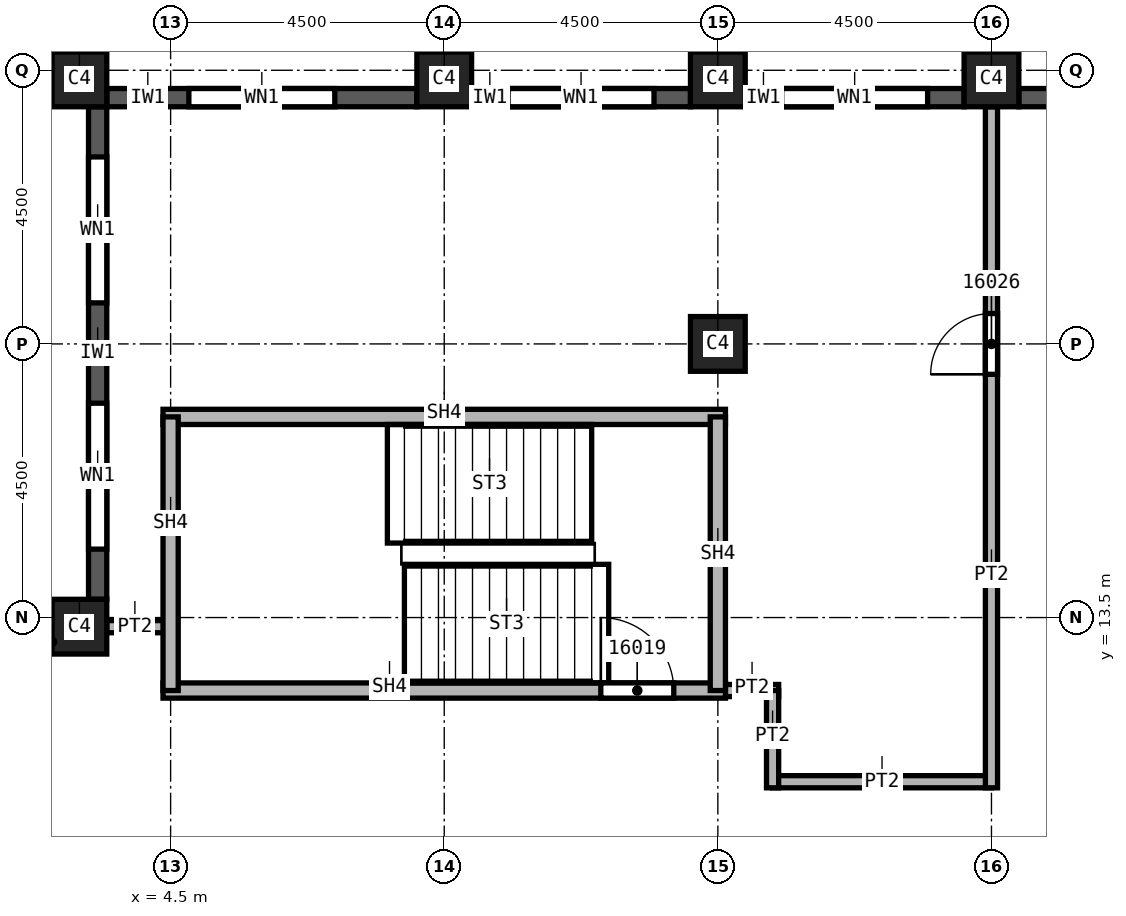
"""IFC4 building model, lengths in metres.
Left out: names, types, materials, properties, quantities, classifications, styles, units other than length and angle.
Written with IfcOpenShell. Run it as: python <this file> out.ifc"""

import sys

from ifc_helpers import new_model, si_unit, direction, frame, frame_2d, origin, origin_2d, place, context, subcontext, project, spatial, rectangle, extrude, element, fill, save


model = new_model("IFC4")
c1 = context("Model", 3, precision=1e-05, world=origin(), true_north=direction((0.0, 1.0)))
c2 = subcontext(c1, "Body", "Model", "MODEL_VIEW")
j1 = project(units=[si_unit("LENGTHUNIT", "METRE"), si_unit("PLANEANGLEUNIT", "RADIAN")], contexts=[c1])
p1 = place(None, origin())
s1 = spatial("IfcSite", under=j1, at=p1, CompositionType="ELEMENT")
p2 = place(p1, origin())
s2 = spatial("IfcBuilding", under=s1, at=p2, CompositionType="ELEMENT")
p3 = place(p2, frame((0.0, 0.0, 246.0)))
s3 = spatial("IfcBuildingStorey", under=s2, at=p3, CompositionType="ELEMENT", Elevation=246.0)
for number, where, z_axis, x_axis in (
    (1, (13.5, 18.0, 0.0), (0.0, 0.0, 1.0), (1.0, 0.0, 0.0)),
    (2, (3.0, 22.35, 0.0), (0.0, 0.0, 1.0), (1.0, 0.0, 0.0)),
    (3, (9.0, 22.35, 0.0), (0.0, 0.0, 1.0), (1.0, 0.0, 0.0)),
    (4, (13.5, 22.35, 0.0), (0.0, 0.0, 1.0), (1.0, 0.0, 0.0)),
    (5, (18.0, 22.35, 0.0), (0.0, 0.0, 1.0), (1.0, 0.0, 0.0)),
    (6, (3.0, 13.35, 0.0), (0.0, 0.0, 1.0), (1.0, 0.0, 0.0)),
):
    element("IfcColumn", number, at=place(p3, frame(where, z_axis=z_axis, x_axis=x_axis)), inside=s3, PredefinedType="COLUMN", context=c2, shape_type="SweptSolid", body=[
        extrude(rectangle(XDim=0.9, YDim=0.9, at=origin_2d()), origin(), (0.0, 0.0, 1.0), 3.72),
    ])
p4 = place(p3, frame((22.05, 22.05, 0.0), z_axis=(0.0, 0.0, 1.0), x_axis=(-1.0, 0.0, 0.0)))
e7 = element("IfcWall", 7, at=p4, inside=s3, PredefinedType="SOLIDWALL", context=c2, shape_type="SweptSolid", body=[
    extrude(rectangle(XDim=3.6, YDim=0.3, at=frame_2d((1.8, 0.0))), origin(), (0.0, 0.0, 1.0), 3.12),
])
p5 = place(p4, frame((0.775, 0.0, 0.8)))
e8 = element("IfcOpeningElement", 8, at=p5, cuts=e7, PredefinedType="OPENING", context=c2, shape_type="SweptSolid", body=[
    extrude(rectangle(XDim=1.0, YDim=1.95, at=frame_2d((0.5, 0.975))), frame((0.0, 0.15, 0.0), z_axis=(0.0, -1.0, 0.0), x_axis=(1.0, 0.0, 0.0)), (0.0, 0.0, 1.0), 0.3),
])
p6 = place(p4, frame((2.375, 0.0, 0.8)))
e9 = element("IfcOpeningElement", 9, at=p6, cuts=e7, PredefinedType="OPENING", context=c2, shape_type="SweptSolid", body=[
    extrude(rectangle(XDim=0.6, YDim=1.95, at=frame_2d((0.3, 0.975))), frame((0.0, 0.15, 0.0), z_axis=(0.0, -1.0, 0.0), x_axis=(1.0, 0.0, 0.0)), (0.0, 0.0, 1.0), 0.3),
])
p7 = place(p3, frame((17.55, 22.05, 0.0), z_axis=(0.0, 0.0, 1.0), x_axis=(-1.0, 0.0, 0.0)))
e10 = element("IfcWall", 10, at=p7, inside=s3, PredefinedType="SOLIDWALL", context=c2, shape_type="SweptSolid", body=[
    extrude(rectangle(XDim=3.6, YDim=0.3, at=frame_2d((1.8, 0.0))), origin(), (0.0, 0.0, 1.0), 3.12),
])
p8 = place(p7, frame((0.6, 0.0, 0.8)))
e11 = element("IfcOpeningElement", 11, at=p8, cuts=e10, PredefinedType="OPENING", context=c2, shape_type="SweptSolid", body=[
    extrude(rectangle(XDim=2.4, YDim=1.95, at=frame_2d((1.2, 0.975))), frame((0.0, 0.15, 0.0), z_axis=(0.0, -1.0, 0.0), x_axis=(1.0, 0.0, 0.0)), (0.0, 0.0, 1.0), 0.3),
])
p9 = place(p3, frame((13.05, 22.05, 0.0), z_axis=(0.0, 0.0, 1.0), x_axis=(-1.0, 0.0, 0.0)))
e12 = element("IfcWall", 12, at=p9, inside=s3, PredefinedType="SOLIDWALL", context=c2, shape_type="SweptSolid", body=[
    extrude(rectangle(XDim=3.6, YDim=0.3, at=frame_2d((1.8, 0.0))), origin(), (0.0, 0.0, 1.0), 3.12),
])
p10 = place(p9, frame((0.6, 0.0, 0.8)))
e13 = element("IfcOpeningElement", 13, at=p10, cuts=e12, PredefinedType="OPENING", context=c2, shape_type="SweptSolid", body=[
    extrude(rectangle(XDim=2.4, YDim=1.95, at=frame_2d((1.2, 0.975))), frame((0.0, 0.15, 0.0), z_axis=(0.0, -1.0, 0.0), x_axis=(1.0, 0.0, 0.0)), (0.0, 0.0, 1.0), 0.3),
])
p11 = place(p3, frame((8.55, 22.05, 0.0), z_axis=(0.0, 0.0, 1.0), x_axis=(-1.0, 0.0, 0.0)))
e14 = element("IfcWall", 14, at=p11, inside=s3, PredefinedType="SOLIDWALL", context=c2, shape_type="SweptSolid", body=[
    extrude(rectangle(XDim=5.1, YDim=0.3, at=frame_2d((2.55, 0.0))), origin(), (0.0, 0.0, 1.0), 3.12),
])
p12 = place(p11, frame((1.35, 0.0, 0.8)))
e15 = element("IfcOpeningElement", 15, at=p12, cuts=e14, PredefinedType="OPENING", context=c2, shape_type="SweptSolid", body=[
    extrude(rectangle(XDim=2.4, YDim=1.95, at=frame_2d((1.2, 0.975))), frame((0.0, 0.15, 0.0), z_axis=(0.0, -1.0, 0.0), x_axis=(1.0, 0.0, 0.0)), (0.0, 0.0, 1.0), 0.3),
])
p13 = place(p3, frame((3.3, 21.9, 0.0), z_axis=(0.0, 0.0, 1.0), x_axis=(0.0, -1.0, 0.0)))
e16 = element("IfcWall", 16, at=p13, inside=s3, PredefinedType="SOLIDWALL", context=c2, shape_type="SweptSolid", body=[
    extrude(rectangle(XDim=8.1, YDim=0.3, at=frame_2d((4.05, 0.0))), origin(), (0.0, 0.0, 1.0), 3.12),
])
p14 = place(p13, frame((0.825, 0.0, 0.8)))
e17 = element("IfcOpeningElement", 17, at=p14, cuts=e16, PredefinedType="OPENING", context=c2, shape_type="SweptSolid", body=[
    extrude(rectangle(XDim=2.4, YDim=1.95, at=frame_2d((1.2, 0.975))), frame((0.0, 0.15, 0.0), z_axis=(0.0, -1.0, 0.0), x_axis=(1.0, 0.0, 0.0)), (0.0, 0.0, 1.0), 0.3),
])
p15 = place(p13, frame((4.875, 0.0, 0.8)))
e18 = element("IfcOpeningElement", 18, at=p15, cuts=e16, PredefinedType="OPENING", context=c2, shape_type="SweptSolid", body=[
    extrude(rectangle(XDim=2.4, YDim=1.95, at=frame_2d((1.2, 0.975))), frame((0.0, 0.15, 0.0), z_axis=(0.0, -1.0, 0.0), x_axis=(1.0, 0.0, 0.0)), (0.0, 0.0, 1.0), 0.3),
])
p16 = place(p3, frame((3.45, 13.35, 0.0), z_axis=(0.0, 0.0, 1.0), x_axis=(1.0, 0.0, 0.0)))
e19 = element("IfcWall", 19, at=p16, inside=s3, PredefinedType="PARTITIONING", context=c2, shape_type="SweptSolid", body=[
    extrude(rectangle(XDim=1.05, YDim=0.2, at=frame_2d((0.525, 0.0))), origin(), (0.0, 0.0, 1.0), 3.72),
])
p17 = place(p3, frame((13.375, 12.3, 0.0), z_axis=(0.0, 0.0, 1.0), x_axis=(1.0, 0.0, 0.0)))
e20 = element("IfcWall", 20, at=p17, inside=s3, PredefinedType="PARTITIONING", context=c2, shape_type="SweptSolid", body=[
    extrude(rectangle(XDim=1.125, YDim=0.2, at=frame_2d((0.562, 0.0))), origin(), (0.0, 0.0, 1.0), 3.72),
])
p18 = place(p3, frame((14.4, 10.8, 0.0), z_axis=(0.0, 0.0, 1.0), x_axis=(1.0, 0.0, 0.0)))
e21 = element("IfcWall", 21, at=p18, inside=s3, PredefinedType="PARTITIONING", context=c2, shape_type="SweptSolid", body=[
    extrude(rectangle(XDim=3.6, YDim=0.2, at=frame_2d((1.8, 0.0))), origin(), (0.0, 0.0, 1.0), 3.72),
])
p19 = place(p3, frame((14.4, 12.3, 0.0), z_axis=(0.0, 0.0, 1.0), x_axis=(0.0, -1.0, 0.0)))
e22 = element("IfcWall", 22, at=p19, inside=s3, PredefinedType="PARTITIONING", context=c2, shape_type="SweptSolid", body=[
    extrude(rectangle(XDim=1.6, YDim=0.2, at=frame_2d((0.8, 0.0))), origin(), (0.0, 0.0, 1.0), 3.72),
])
p20 = place(p3, frame((18.0, 10.7, 0.0), z_axis=(0.0, 0.0, 1.0), x_axis=(0.0, 1.0, 0.0)))
e23 = element("IfcWall", 23, at=p20, inside=s3, PredefinedType="PARTITIONING", context=c2, shape_type="SweptSolid", body=[
    extrude(rectangle(XDim=11.2, YDim=0.2, at=frame_2d((5.6, 0.0))), origin(), (0.0, 0.0, 1.0), 3.72),
])
p21 = place(p20, frame((6.8, 0.0, 0.0)))
e24 = element("IfcOpeningElement", 24, at=p21, cuts=e23, PredefinedType="OPENING", context=c2, shape_type="SweptSolid", body=[
    extrude(rectangle(XDim=1.0, YDim=2.1, at=frame_2d((0.5, 1.05))), frame((0.0, 0.1, 0.0), z_axis=(0.0, -1.0, 0.0), x_axis=(1.0, 0.0, 0.0)), (0.0, 0.0, 1.0), 0.2),
])
p22 = place(p3, frame((4.375, 12.3, 0.0), z_axis=(0.0, 0.0, 1.0), x_axis=(1.0, 0.0, 0.0)))
e25 = element("IfcWall", 25, at=p22, inside=s3, PredefinedType="SOLIDWALL", context=c2, shape_type="SweptSolid", body=[
    extrude(rectangle(XDim=9.25, YDim=0.25, at=frame_2d((4.625, 0.0))), origin(), (0.0, 0.0, 1.0), 3.72),
])
p23 = place(p22, frame((7.2, 0.0, 0.0)))
e26 = element("IfcOpeningElement", 26, at=p23, cuts=e25, PredefinedType="OPENING", context=c2, shape_type="SweptSolid", body=[
    extrude(rectangle(XDim=1.2, YDim=2.1, at=frame_2d((0.6, 1.05))), frame((0.0, 0.125, 0.0), z_axis=(0.0, -1.0, 0.0), x_axis=(1.0, 0.0, 0.0)), (0.0, 0.0, 1.0), 0.25),
])
p24 = place(p3, frame((4.375, 16.8, 0.0), z_axis=(0.0, 0.0, 1.0), x_axis=(1.0, 0.0, 0.0)))
e27 = element("IfcWall", 27, at=p24, inside=s3, PredefinedType="SOLIDWALL", context=c2, shape_type="SweptSolid", body=[
    extrude(rectangle(XDim=9.25, YDim=0.25, at=frame_2d((4.625, 0.0))), origin(), (0.0, 0.0, 1.0), 3.72),
])
for number, where, z_axis, x_axis in (
    (28, (4.5, 12.3, 0.0), (0.0, 0.0, 1.0), (0.0, 1.0, 0.0)),
    (29, (13.5, 16.8, 0.0), (0.0, 0.0, 1.0), (0.0, -1.0, 0.0)),
):
    element("IfcWall", number, at=place(p3, frame(where, z_axis=z_axis, x_axis=x_axis)), inside=s3, PredefinedType="SOLIDWALL", context=c2, shape_type="SweptSolid", body=[
        extrude(rectangle(XDim=4.5, YDim=0.25, at=frame_2d((2.25, 0.0))), origin(), (0.0, 0.0, 1.0), 3.72),
    ])
p25 = place(p8, origin())
e30 = element("IfcWindow", 30, at=p25, inside=s3, PartitioningType="SINGLE_PANEL", PredefinedType="WINDOW", context=c2, shape_type="SweptSolid", body=[
    extrude(rectangle(XDim=2.4, YDim=1.95, at=frame_2d((1.2, 0.975))), frame((0.0, 0.03, 0.0), z_axis=(0.0, -1.0, 0.0), x_axis=(1.0, 0.0, 0.0)), (0.0, 0.0, 1.0), 0.06),
])
fill(e11, e30)
p26 = place(p10, origin())
e31 = element("IfcWindow", 31, at=p26, inside=s3, PartitioningType="SINGLE_PANEL", PredefinedType="WINDOW", context=c2, shape_type="SweptSolid", body=[
    extrude(rectangle(XDim=2.4, YDim=1.95, at=frame_2d((1.2, 0.975))), frame((0.0, 0.03, 0.0), z_axis=(0.0, -1.0, 0.0), x_axis=(1.0, 0.0, 0.0)), (0.0, 0.0, 1.0), 0.06),
])
fill(e13, e31)
p27 = place(p12, origin())
e32 = element("IfcWindow", 32, at=p27, inside=s3, PartitioningType="SINGLE_PANEL", PredefinedType="WINDOW", context=c2, shape_type="SweptSolid", body=[
    extrude(rectangle(XDim=2.4, YDim=1.95, at=frame_2d((1.2, 0.975))), frame((0.0, 0.03, 0.0), z_axis=(0.0, -1.0, 0.0), x_axis=(1.0, 0.0, 0.0)), (0.0, 0.0, 1.0), 0.06),
])
fill(e15, e32)
p28 = place(p14, origin())
e33 = element("IfcWindow", 33, at=p28, inside=s3, PartitioningType="SINGLE_PANEL", PredefinedType="WINDOW", context=c2, shape_type="SweptSolid", body=[
    extrude(rectangle(XDim=2.4, YDim=1.95, at=frame_2d((1.2, 0.975))), frame((0.0, 0.03, 0.0), z_axis=(0.0, -1.0, 0.0), x_axis=(1.0, 0.0, 0.0)), (0.0, 0.0, 1.0), 0.06),
])
fill(e17, e33)
p29 = place(p15, origin())
e34 = element("IfcWindow", 34, at=p29, inside=s3, PartitioningType="SINGLE_PANEL", PredefinedType="WINDOW", context=c2, shape_type="SweptSolid", body=[
    extrude(rectangle(XDim=2.4, YDim=1.95, at=frame_2d((1.2, 0.975))), frame((0.0, 0.03, 0.0), z_axis=(0.0, -1.0, 0.0), x_axis=(1.0, 0.0, 0.0)), (0.0, 0.0, 1.0), 0.06),
])
fill(e18, e34)
p30 = place(p23, origin())
e35 = element("IfcDoor", 35, at=p30, inside=s3, OperationType="SINGLE_SWING_RIGHT", PredefinedType="DOOR", context=c2, shape_type="SweptSolid", body=[
    extrude(rectangle(XDim=1.2, YDim=2.1, at=frame_2d((0.6, 1.05))), frame((0.0, 0.025, 0.0), z_axis=(0.0, -1.0, 0.0), x_axis=(1.0, 0.0, 0.0)), (0.0, 0.0, 1.0), 0.05),
])
fill(e26, e35)
p31 = place(p21, origin())
e36 = element("IfcDoor", 36, at=p31, inside=s3, OperationType="SINGLE_SWING_LEFT", PredefinedType="DOOR", context=c2, shape_type="SweptSolid", body=[
    extrude(rectangle(XDim=1.0, YDim=2.1, at=frame_2d((0.5, 1.05))), frame((0.0, 0.025, 0.0), z_axis=(0.0, -1.0, 0.0), x_axis=(1.0, 0.0, 0.0)), (0.0, 0.0, 1.0), 0.05),
])
fill(e24, e36)
save(model, sys.argv[1])
